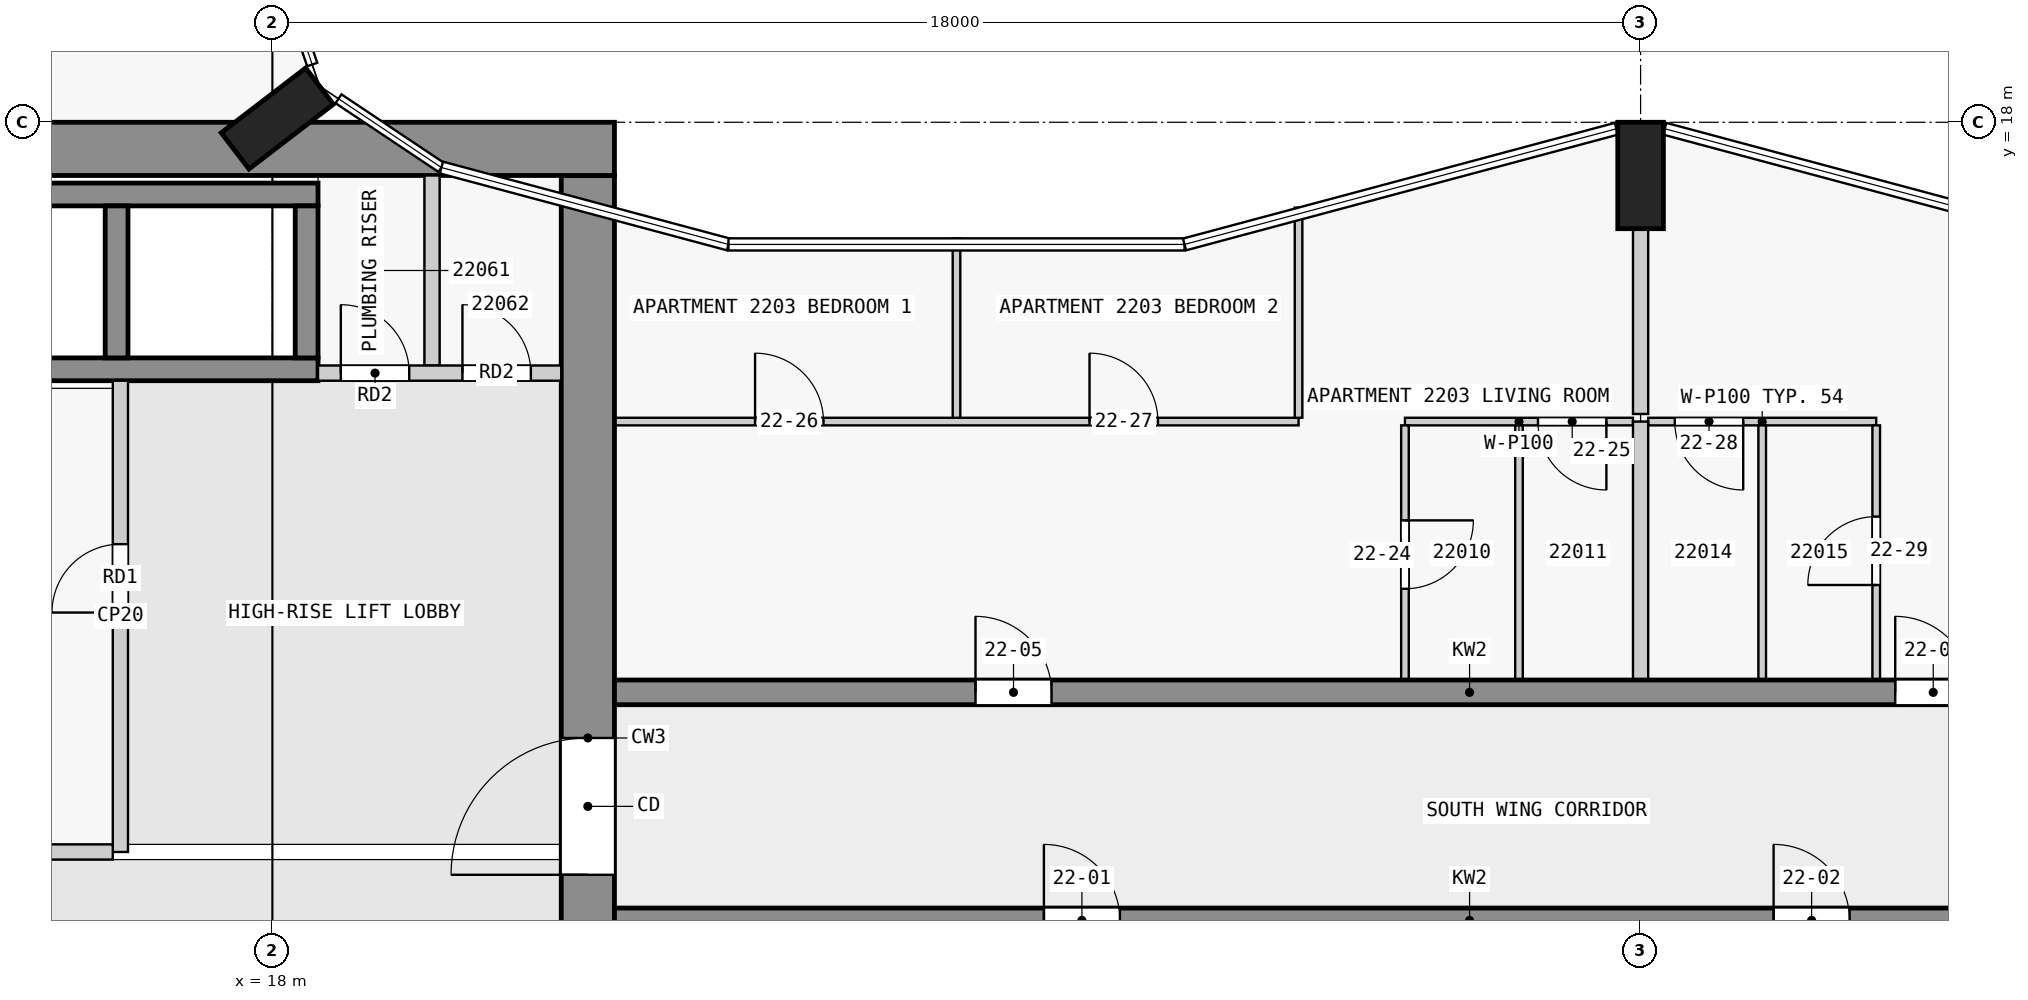
"""IFC4 building model, lengths in metres.
Left out: names, types, materials, properties, quantities, classifications, styles, units other than length and angle.
Written with IfcOpenShell. Run it as: python <this file> out.ifc"""

import sys

from ifc_helpers import new_model, si_unit, direction, frame, frame_2d, origin, origin_2d, place, context, subcontext, project, spatial, rectangle, extrude, element, fill, save


model = new_model("IFC4")
c1 = context("Model", 3, precision=1e-05, world=origin(), true_north=direction((0.0, 1.0)))
c2 = subcontext(c1, "Body", "Model", "MODEL_VIEW")
j1 = project(units=[si_unit("LENGTHUNIT", "METRE"), si_unit("PLANEANGLEUNIT", "RADIAN")], contexts=[c1])
p1 = place(None, origin())
s1 = spatial("IfcSite", under=j1, at=p1, CompositionType="ELEMENT")
p2 = place(p1, origin())
s2 = spatial("IfcBuilding", under=s1, at=p2, CompositionType="ELEMENT")
p3 = place(p2, frame((0.0, 0.0, 88.8)))
s3 = spatial("IfcBuildingStorey", under=s2, at=p3, CompositionType="ELEMENT", Elevation=88.8)
for number, where, z_axis, x_axis in (
    (1, (36.0, 17.3, 0.0), (0.0, 0.0, 1.0), (1.0, 0.0, 0.0)),
    (2, (18.065, 18.05, 0.0), (0.0, 0.0, 1.0), (-0.609, 0.793, 0.0)),
):
    element("IfcColumn", number, at=place(p3, frame(where, z_axis=z_axis, x_axis=x_axis)), inside=s3, PredefinedType="COLUMN", context=c2, shape_type="SweptSolid", body=[
        extrude(rectangle(XDim=0.6, YDim=1.4, at=origin_2d()), origin(), (0.0, 0.0, 1.0), 3.5),
    ])
p4 = place(p3, frame((1.6, 17.65, 0.0), z_axis=(0.0, 0.0, 1.0), x_axis=(1.0, 0.0, 0.0)))
e3 = element("IfcWall", 3, at=p4, inside=s3, PredefinedType="SHEAR", context=c2, shape_type="SweptSolid", body=[
    extrude(rectangle(XDim=20.9, YDim=0.7, at=frame_2d((10.45, 0.0))), origin(), (0.0, 0.0, 1.0), 3.25),
])
p5 = place(p4, frame((6.5, 0.0, 0.0)))
e4 = element("IfcOpeningElement", 4, at=p5, cuts=e3, PredefinedType="OPENING", context=c2, shape_type="SweptSolid", body=[
    extrude(rectangle(XDim=1.8, YDim=2.1, at=frame_2d((0.9, 1.05))), frame((0.0, 0.36, 0.0), z_axis=(0.0, -1.0, 0.0), x_axis=(1.0, 0.0, 0.0)), (0.0, 0.0, 1.0), 0.72),
])
p6 = place(p3, frame((22.15, 2.5, 0.0), z_axis=(0.0, 0.0, 1.0), x_axis=(0.0, 1.0, 0.0)))
e5 = element("IfcWall", 5, at=p6, inside=s3, PredefinedType="SHEAR", context=c2, shape_type="SweptSolid", body=[
    extrude(rectangle(XDim=14.8, YDim=0.7, at=frame_2d((7.4, 0.0))), origin(), (0.0, 0.0, 1.0), 3.25),
])
p7 = place(p6, frame((5.6, 0.0, 0.0)))
e6 = element("IfcOpeningElement", 6, at=p7, cuts=e5, PredefinedType="OPENING", context=c2, shape_type="SweptSolid", body=[
    extrude(rectangle(XDim=1.8, YDim=2.1, at=frame_2d((0.9, 1.05))), frame((0.0, 0.36, 0.0), z_axis=(0.0, -1.0, 0.0), x_axis=(1.0, 0.0, 0.0)), (0.0, 0.0, 1.0), 0.72),
])
for number, where, z_axis, x_axis in (
    (7, (10.8, 17.05, 0.0), (0.0, 0.0, 1.0), (1.0, 0.0, 0.0)),
    (8, (10.8, 14.75, 0.0), (0.0, 0.0, 1.0), (1.0, 0.0, 0.0)),
):
    element("IfcWall", number, at=place(p3, frame(where, z_axis=z_axis, x_axis=x_axis)), inside=s3, PredefinedType="SHEAR", context=c2, shape_type="SweptSolid", body=[
        extrude(rectangle(XDim=7.8, YDim=0.3, at=frame_2d((3.9, 0.0))), origin(), (0.0, 0.0, 1.0), 3.25),
    ])
for number, where, z_axis, x_axis in (
    (9, (15.95, 14.9, 0.0), (0.0, 0.0, 1.0), (0.0, 1.0, 0.0)),
    (10, (18.45, 14.9, 0.0), (0.0, 0.0, 1.0), (0.0, 1.0, 0.0)),
):
    element("IfcWall", number, at=place(p3, frame(where, z_axis=z_axis, x_axis=x_axis)), inside=s3, PredefinedType="SHEAR", context=c2, shape_type="SweptSolid", body=[
        extrude(rectangle(XDim=2.0, YDim=0.3, at=frame_2d((1.0, 0.0))), origin(), (0.0, 0.0, 1.0), 3.25),
    ])
p8 = place(p3, frame((22.5, 7.5, 0.0), z_axis=(0.0, 0.0, 1.0), x_axis=(1.0, 0.0, 0.0)))
e11 = element("IfcWall", 11, at=p8, inside=s3, PredefinedType="SHEAR", context=c2, shape_type="SweptSolid", body=[
    extrude(rectangle(XDim=22.5, YDim=0.325, at=frame_2d((11.25, 0.0))), origin(), (0.0, 0.0, 1.0), 3.25),
])
p9 = place(p8, frame((5.65, 0.0, 0.0)))
e12 = element("IfcOpeningElement", 12, at=p9, cuts=e11, PredefinedType="OPENING", context=c2, shape_type="SweptSolid", body=[
    extrude(rectangle(XDim=1.0, YDim=2.1, at=frame_2d((0.5, 1.05))), frame((0.0, 0.172, 0.0), z_axis=(0.0, -1.0, 0.0), x_axis=(1.0, 0.0, 0.0)), (0.0, 0.0, 1.0), 0.345),
])
p10 = place(p8, frame((15.25, 0.0, 0.0)))
e13 = element("IfcOpeningElement", 13, at=p10, cuts=e11, PredefinedType="OPENING", context=c2, shape_type="SweptSolid", body=[
    extrude(rectangle(XDim=1.0, YDim=2.1, at=frame_2d((0.5, 1.05))), frame((0.0, 0.172, 0.0), z_axis=(0.0, -1.0, 0.0), x_axis=(1.0, 0.0, 0.0)), (0.0, 0.0, 1.0), 0.345),
])
p11 = place(p8, frame((18.75, 0.0, 0.0)))
e14 = element("IfcOpeningElement", 14, at=p11, cuts=e11, PredefinedType="OPENING", context=c2, shape_type="SweptSolid", body=[
    extrude(rectangle(XDim=0.9, YDim=2.1, at=frame_2d((0.45, 1.05))), frame((0.0, 0.172, 0.0), z_axis=(0.0, -1.0, 0.0), x_axis=(1.0, 0.0, 0.0)), (0.0, 0.0, 1.0), 0.345),
])
p12 = place(p8, frame((20.95, 0.0, 0.0)))
e15 = element("IfcOpeningElement", 15, at=p12, cuts=e11, PredefinedType="OPENING", context=c2, shape_type="SweptSolid", body=[
    extrude(rectangle(XDim=1.0, YDim=2.1, at=frame_2d((0.5, 1.05))), frame((0.0, 0.172, 0.0), z_axis=(0.0, -1.0, 0.0), x_axis=(1.0, 0.0, 0.0)), (0.0, 0.0, 1.0), 0.345),
])
p13 = place(p3, frame((22.5, 10.5, 0.0), z_axis=(0.0, 0.0, 1.0), x_axis=(1.0, 0.0, 0.0)))
e16 = element("IfcWall", 16, at=p13, inside=s3, PredefinedType="SHEAR", context=c2, shape_type="SweptSolid", body=[
    extrude(rectangle(XDim=22.5, YDim=0.325, at=frame_2d((11.25, 0.0))), origin(), (0.0, 0.0, 1.0), 3.25),
])
p14 = place(p13, frame((4.75, 0.0, 0.0)))
e17 = element("IfcOpeningElement", 17, at=p14, cuts=e16, PredefinedType="OPENING", context=c2, shape_type="SweptSolid", body=[
    extrude(rectangle(XDim=1.0, YDim=2.1, at=frame_2d((0.5, 1.05))), frame((0.0, 0.172, 0.0), z_axis=(0.0, -1.0, 0.0), x_axis=(1.0, 0.0, 0.0)), (0.0, 0.0, 1.0), 0.345),
])
p15 = place(p13, frame((16.85, 0.0, 0.0)))
e18 = element("IfcOpeningElement", 18, at=p15, cuts=e16, PredefinedType="OPENING", context=c2, shape_type="SweptSolid", body=[
    extrude(rectangle(XDim=1.0, YDim=2.1, at=frame_2d((0.5, 1.05))), frame((0.0, 0.172, 0.0), z_axis=(0.0, -1.0, 0.0), x_axis=(1.0, 0.0, 0.0)), (0.0, 0.0, 1.0), 0.345),
])
p16 = place(p3, frame((10.9, 8.4, 0.0), z_axis=(0.0, 0.0, 1.0), x_axis=(1.0, 0.0, 0.0)))
e19 = element("IfcWall", 19, at=p16, inside=s3, PredefinedType="PARTITIONING", context=c2, shape_type="SweptSolid", body=[
    extrude(rectangle(XDim=5.0, YDim=0.2, at=frame_2d((2.5, 0.0))), origin(), (0.0, 0.0, 1.0), 3.25),
])
p17 = place(p3, frame((16.0, 8.4, 0.0), z_axis=(0.0, 0.0, 1.0), x_axis=(0.0, 1.0, 0.0)))
e20 = element("IfcWall", 20, at=p17, inside=s3, PredefinedType="PARTITIONING", context=c2, shape_type="SweptSolid", body=[
    extrude(rectangle(XDim=6.2, YDim=0.2, at=frame_2d((3.1, 0.0))), origin(), (0.0, 0.0, 1.0), 3.25),
])
p18 = place(p17, frame((3.15, 0.0, 0.0)))
e21 = element("IfcOpeningElement", 21, at=p18, cuts=e20, PredefinedType="OPENING", context=c2, shape_type="SweptSolid", body=[
    extrude(rectangle(XDim=0.9, YDim=2.1, at=frame_2d((0.45, 1.05))), frame((0.0, 0.11, 0.0), z_axis=(0.0, -1.0, 0.0), x_axis=(1.0, 0.0, 0.0)), (0.0, 0.0, 1.0), 0.22),
])
p19 = place(p3, frame((18.6, 14.7, 0.0), z_axis=(0.0, 0.0, 1.0), x_axis=(1.0, 0.0, 0.0)))
e22 = element("IfcWall", 22, at=p19, inside=s3, PredefinedType="PARTITIONING", context=c2, shape_type="SweptSolid", body=[
    extrude(rectangle(XDim=3.2, YDim=0.2, at=frame_2d((1.6, 0.0))), origin(), (0.0, 0.0, 1.0), 3.25),
])
p20 = place(p19, frame((0.3, 0.0, 0.0)))
e23 = element("IfcOpeningElement", 23, at=p20, cuts=e22, PredefinedType="OPENING", context=c2, shape_type="SweptSolid", body=[
    extrude(rectangle(XDim=0.9, YDim=2.1, at=frame_2d((0.45, 1.05))), frame((0.0, 0.11, 0.0), z_axis=(0.0, -1.0, 0.0), x_axis=(1.0, 0.0, 0.0)), (0.0, 0.0, 1.0), 0.22),
])
p21 = place(p19, frame((1.9, 0.0, 0.0)))
e24 = element("IfcOpeningElement", 24, at=p21, cuts=e22, PredefinedType="OPENING", context=c2, shape_type="SweptSolid", body=[
    extrude(rectangle(XDim=0.9, YDim=2.1, at=frame_2d((0.45, 1.05))), frame((0.0, 0.11, 0.0), z_axis=(0.0, -1.0, 0.0), x_axis=(1.0, 0.0, 0.0)), (0.0, 0.0, 1.0), 0.22),
])
p22 = place(p3, frame((20.1, 14.8, 0.0), z_axis=(0.0, 0.0, 1.0), x_axis=(0.0, 1.0, 0.0)))
e25 = element("IfcWall", 25, at=p22, inside=s3, PredefinedType="PARTITIONING", context=c2, shape_type="SweptSolid", body=[
    extrude(rectangle(XDim=2.5, YDim=0.2, at=frame_2d((1.25, 0.0))), origin(), (0.0, 0.0, 1.0), 3.25),
])
p23 = place(p3, frame((35.9, 14.062, 0.0), z_axis=(0.0, 0.0, 1.0), x_axis=(-1.0, 0.0, 0.0)))
e26 = element("IfcWall", 26, at=p23, inside=s3, PredefinedType="PARTITIONING", context=c2, shape_type="SweptSolid", body=[
    extrude(rectangle(XDim=3.0, YDim=0.1, at=frame_2d((1.5, 0.0))), origin(), (0.0, 0.0, 1.0), 3.25),
])
p24 = place(p23, frame((0.35, 0.0, 0.0)))
e27 = element("IfcOpeningElement", 27, at=p24, cuts=e26, PredefinedType="OPENING", context=c2, shape_type="SweptSolid", body=[
    extrude(rectangle(XDim=0.9, YDim=2.1, at=frame_2d((0.45, 1.05))), frame((0.0, 0.06, 0.0), z_axis=(0.0, -1.0, 0.0), x_axis=(1.0, 0.0, 0.0)), (0.0, 0.0, 1.0), 0.12),
])
p25 = place(p3, frame((39.1, 14.062, 0.0), z_axis=(0.0, 0.0, 1.0), x_axis=(-1.0, 0.0, 0.0)))
e28 = element("IfcWall", 28, at=p25, inside=s3, PredefinedType="PARTITIONING", context=c2, shape_type="SweptSolid", body=[
    extrude(rectangle(XDim=3.0, YDim=0.1, at=frame_2d((1.5, 0.0))), origin(), (0.0, 0.0, 1.0), 3.25),
])
p26 = place(p25, frame((1.75, 0.0, 0.0)))
e29 = element("IfcOpeningElement", 29, at=p26, cuts=e28, PredefinedType="OPENING", context=c2, shape_type="SweptSolid", body=[
    extrude(rectangle(XDim=0.9, YDim=2.1, at=frame_2d((0.45, 1.05))), frame((0.0, 0.06, 0.0), z_axis=(0.0, -1.0, 0.0), x_axis=(1.0, 0.0, 0.0)), (0.0, 0.0, 1.0), 0.12),
])
p27 = place(p3, frame((22.5, 14.062, 0.0), z_axis=(0.0, 0.0, 1.0), x_axis=(1.0, 0.0, 0.0)))
e30 = element("IfcWall", 30, at=p27, inside=s3, PredefinedType="PARTITIONING", context=c2, shape_type="SweptSolid", body=[
    extrude(rectangle(XDim=9.0, YDim=0.1, at=frame_2d((4.5, 0.0))), origin(), (0.0, 0.0, 1.0), 3.25),
])
p28 = place(p27, frame((1.85, 0.0, 0.0)))
e31 = element("IfcOpeningElement", 31, at=p28, cuts=e30, PredefinedType="OPENING", context=c2, shape_type="SweptSolid", body=[
    extrude(rectangle(XDim=0.9, YDim=2.1, at=frame_2d((0.45, 1.05))), frame((0.0, 0.06, 0.0), z_axis=(0.0, -1.0, 0.0), x_axis=(1.0, 0.0, 0.0)), (0.0, 0.0, 1.0), 0.12),
])
p29 = place(p27, frame((6.25, 0.0, 0.0)))
e32 = element("IfcOpeningElement", 32, at=p29, cuts=e30, PredefinedType="OPENING", context=c2, shape_type="SweptSolid", body=[
    extrude(rectangle(XDim=0.9, YDim=2.1, at=frame_2d((0.45, 1.05))), frame((0.0, 0.06, 0.0), z_axis=(0.0, -1.0, 0.0), x_axis=(1.0, 0.0, 0.0)), (0.0, 0.0, 1.0), 0.12),
])
p30 = place(p3, frame((27.0, 14.113, 0.0), z_axis=(0.0, 0.0, 1.0), x_axis=(0.0, 1.0, 0.0)))
e33 = element("IfcWall", 33, at=p30, inside=s3, PredefinedType="PARTITIONING", context=c2, shape_type="SweptSolid", body=[
    extrude(rectangle(XDim=2.361, YDim=0.1, at=frame_2d((1.18, 0.0))), origin(), (0.0, 0.0, 1.0), 3.25),
])
p31 = place(p3, frame((31.5, 14.113, 0.0), z_axis=(0.0, 0.0, 1.0), x_axis=(0.0, 1.0, 0.0)))
e34 = element("IfcWall", 34, at=p31, inside=s3, PredefinedType="PARTITIONING", context=c2, shape_type="SweptSolid", body=[
    extrude(rectangle(XDim=2.765, YDim=0.1, at=frame_2d((1.383, 0.0))), origin(), (0.0, 0.0, 1.0), 3.25),
])
p32 = place(p3, frame((32.9, 14.012, 0.0), z_axis=(0.0, 0.0, 1.0), x_axis=(0.0, -1.0, 0.0)))
e35 = element("IfcWall", 35, at=p32, inside=s3, PredefinedType="PARTITIONING", context=c2, shape_type="SweptSolid", body=[
    extrude(rectangle(XDim=3.35, YDim=0.1, at=frame_2d((1.675, 0.0))), origin(), (0.0, 0.0, 1.0), 3.25),
])
p33 = place(p32, frame((1.25, 0.0, 0.0)))
e36 = element("IfcOpeningElement", 36, at=p33, cuts=e35, PredefinedType="OPENING", context=c2, shape_type="SweptSolid", body=[
    extrude(rectangle(XDim=0.9, YDim=2.1, at=frame_2d((0.45, 1.05))), frame((0.0, 0.06, 0.0), z_axis=(0.0, -1.0, 0.0), x_axis=(1.0, 0.0, 0.0)), (0.0, 0.0, 1.0), 0.12),
])
p34 = place(p3, frame((34.4, 10.663, 0.0), z_axis=(0.0, 0.0, 1.0), x_axis=(0.0, 1.0, 0.0)))
e37 = element("IfcWall", 37, at=p34, inside=s3, PredefinedType="PARTITIONING", context=c2, shape_type="SweptSolid", body=[
    extrude(rectangle(XDim=3.35, YDim=0.1, at=frame_2d((1.675, 0.0))), origin(), (0.0, 0.0, 1.0), 3.25),
])
p35 = place(p3, frame((36.0, 16.6, 0.0), z_axis=(0.0, 0.0, 1.0), x_axis=(0.0, -1.0, 0.0)))
e38 = element("IfcWall", 38, at=p35, inside=s3, PredefinedType="PARTITIONING", context=c2, shape_type="SweptSolid", body=[
    extrude(rectangle(XDim=2.438, YDim=0.2, at=frame_2d((1.219, 0.0))), origin(), (0.0, 0.0, 1.0), 3.25),
])
p36 = place(p3, frame((36.0, 10.663, 0.0), z_axis=(0.0, 0.0, 1.0), x_axis=(0.0, 1.0, 0.0)))
e39 = element("IfcWall", 39, at=p36, inside=s3, PredefinedType="PARTITIONING", context=c2, shape_type="SweptSolid", body=[
    extrude(rectangle(XDim=3.4, YDim=0.2, at=frame_2d((1.7, 0.0))), origin(), (0.0, 0.0, 1.0), 3.25),
])
p37 = place(p3, frame((37.6, 10.663, 0.0), z_axis=(0.0, 0.0, 1.0), x_axis=(0.0, 1.0, 0.0)))
e40 = element("IfcWall", 40, at=p37, inside=s3, PredefinedType="PARTITIONING", context=c2, shape_type="SweptSolid", body=[
    extrude(rectangle(XDim=3.35, YDim=0.1, at=frame_2d((1.675, 0.0))), origin(), (0.0, 0.0, 1.0), 3.25),
])
p38 = place(p3, frame((39.1, 10.663, 0.0), z_axis=(0.0, 0.0, 1.0), x_axis=(0.0, 1.0, 0.0)))
e41 = element("IfcWall", 41, at=p38, inside=s3, PredefinedType="PARTITIONING", context=c2, shape_type="SweptSolid", body=[
    extrude(rectangle(XDim=3.35, YDim=0.1, at=frame_2d((1.675, 0.0))), origin(), (0.0, 0.0, 1.0), 3.25),
])
p39 = place(p38, frame((1.25, 0.0, 0.0)))
e42 = element("IfcOpeningElement", 42, at=p39, cuts=e41, PredefinedType="OPENING", context=c2, shape_type="SweptSolid", body=[
    extrude(rectangle(XDim=0.9, YDim=2.1, at=frame_2d((0.45, 1.05))), frame((0.0, 0.06, 0.0), z_axis=(0.0, -1.0, 0.0), x_axis=(1.0, 0.0, 0.0)), (0.0, 0.0, 1.0), 0.12),
])
p40 = place(p18, origin())
e43 = element("IfcDoor", 43, at=p40, inside=s3, OperationType="SINGLE_SWING_LEFT", PredefinedType="DOOR", context=c2, shape_type="SweptSolid", body=[
    extrude(rectangle(XDim=0.9, YDim=2.1, at=frame_2d((0.45, 1.05))), frame((0.0, 0.025, 0.0), z_axis=(0.0, -1.0, 0.0), x_axis=(1.0, 0.0, 0.0)), (0.0, 0.0, 1.0), 0.05),
])
fill(e21, e43)
p41 = place(p7, origin())
e44 = element("IfcDoor", 44, at=p41, inside=s3, OperationType="DOUBLE_DOOR_SINGLE_SWING", PredefinedType="DOOR", context=c2, shape_type="SweptSolid", body=[
    extrude(rectangle(XDim=1.8, YDim=2.1, at=frame_2d((0.9, 1.05))), frame((0.0, 0.025, 0.0), z_axis=(0.0, -1.0, 0.0), x_axis=(1.0, 0.0, 0.0)), (0.0, 0.0, 1.0), 0.05),
])
fill(e6, e44)
p42 = place(p20, origin())
e45 = element("IfcDoor", 45, at=p42, inside=s3, OperationType="SINGLE_SWING_LEFT", PredefinedType="DOOR", context=c2, shape_type="SweptSolid", body=[
    extrude(rectangle(XDim=0.9, YDim=2.1, at=frame_2d((0.45, 1.05))), frame((0.0, 0.025, 0.0), z_axis=(0.0, -1.0, 0.0), x_axis=(1.0, 0.0, 0.0)), (0.0, 0.0, 1.0), 0.05),
])
fill(e23, e45)
p43 = place(p21, origin())
e46 = element("IfcDoor", 46, at=p43, inside=s3, OperationType="SINGLE_SWING_LEFT", PredefinedType="DOOR", context=c2, shape_type="SweptSolid", body=[
    extrude(rectangle(XDim=0.9, YDim=2.1, at=frame_2d((0.45, 1.05))), frame((0.0, 0.025, 0.0), z_axis=(0.0, -1.0, 0.0), x_axis=(1.0, 0.0, 0.0)), (0.0, 0.0, 1.0), 0.05),
])
fill(e24, e46)
p44 = place(p9, origin())
e47 = element("IfcDoor", 47, at=p44, inside=s3, OperationType="SINGLE_SWING_LEFT", PredefinedType="DOOR", context=c2, shape_type="SweptSolid", body=[
    extrude(rectangle(XDim=1.0, YDim=2.1, at=frame_2d((0.5, 1.05))), frame((0.0, 0.025, 0.0), z_axis=(0.0, -1.0, 0.0), x_axis=(1.0, 0.0, 0.0)), (0.0, 0.0, 1.0), 0.05),
])
fill(e12, e47)
p45 = place(p10, origin())
e48 = element("IfcDoor", 48, at=p45, inside=s3, OperationType="SINGLE_SWING_RIGHT", PredefinedType="DOOR", context=c2, shape_type="SweptSolid", body=[
    extrude(rectangle(XDim=1.0, YDim=2.1, at=frame_2d((0.5, 1.05))), frame((0.0, 0.025, 0.0), z_axis=(0.0, -1.0, 0.0), x_axis=(1.0, 0.0, 0.0)), (0.0, 0.0, 1.0), 0.05),
])
fill(e13, e48)
p46 = place(p14, origin())
e49 = element("IfcDoor", 49, at=p46, inside=s3, OperationType="SINGLE_SWING_LEFT", PredefinedType="DOOR", context=c2, shape_type="SweptSolid", body=[
    extrude(rectangle(XDim=1.0, YDim=2.1, at=frame_2d((0.5, 1.05))), frame((0.0, 0.025, 0.0), z_axis=(0.0, -1.0, 0.0), x_axis=(1.0, 0.0, 0.0)), (0.0, 0.0, 1.0), 0.05),
])
fill(e17, e49)
p47 = place(p15, origin())
e50 = element("IfcDoor", 50, at=p47, inside=s3, OperationType="SINGLE_SWING_RIGHT", PredefinedType="DOOR", context=c2, shape_type="SweptSolid", body=[
    extrude(rectangle(XDim=1.0, YDim=2.1, at=frame_2d((0.5, 1.05))), frame((0.0, 0.025, 0.0), z_axis=(0.0, -1.0, 0.0), x_axis=(1.0, 0.0, 0.0)), (0.0, 0.0, 1.0), 0.05),
])
fill(e18, e50)
p48 = place(p33, origin())
e51 = element("IfcDoor", 51, at=p48, inside=s3, OperationType="SINGLE_SWING_RIGHT", PredefinedType="DOOR", context=c2, shape_type="SweptSolid", body=[
    extrude(rectangle(XDim=0.9, YDim=2.1, at=frame_2d((0.45, 1.05))), frame((0.0, 0.025, 0.0), z_axis=(0.0, -1.0, 0.0), x_axis=(1.0, 0.0, 0.0)), (0.0, 0.0, 1.0), 0.05),
])
fill(e36, e51)
p49 = place(p24, origin())
e52 = element("IfcDoor", 52, at=p49, inside=s3, OperationType="SINGLE_SWING_LEFT", PredefinedType="DOOR", context=c2, shape_type="SweptSolid", body=[
    extrude(rectangle(XDim=0.9, YDim=2.1, at=frame_2d((0.45, 1.05))), frame((0.0, 0.025, 0.0), z_axis=(0.0, -1.0, 0.0), x_axis=(1.0, 0.0, 0.0)), (0.0, 0.0, 1.0), 0.05),
])
fill(e27, e52)
p50 = place(p28, origin())
e53 = element("IfcDoor", 53, at=p50, inside=s3, OperationType="SINGLE_SWING_LEFT", PredefinedType="DOOR", context=c2, shape_type="SweptSolid", body=[
    extrude(rectangle(XDim=0.9, YDim=2.1, at=frame_2d((0.45, 1.05))), frame((0.0, 0.025, 0.0), z_axis=(0.0, -1.0, 0.0), x_axis=(1.0, 0.0, 0.0)), (0.0, 0.0, 1.0), 0.05),
])
fill(e31, e53)
p51 = place(p29, origin())
e54 = element("IfcDoor", 54, at=p51, inside=s3, OperationType="SINGLE_SWING_RIGHT", PredefinedType="DOOR", context=c2, shape_type="SweptSolid", body=[
    extrude(rectangle(XDim=0.9, YDim=2.1, at=frame_2d((0.45, 1.05))), frame((0.0, 0.025, 0.0), z_axis=(0.0, -1.0, 0.0), x_axis=(1.0, 0.0, 0.0)), (0.0, 0.0, 1.0), 0.05),
])
fill(e32, e54)
p52 = place(p26, origin())
e55 = element("IfcDoor", 55, at=p52, inside=s3, OperationType="SINGLE_SWING_RIGHT", PredefinedType="DOOR", context=c2, shape_type="SweptSolid", body=[
    extrude(rectangle(XDim=0.9, YDim=2.1, at=frame_2d((0.45, 1.05))), frame((0.0, 0.025, 0.0), z_axis=(0.0, -1.0, 0.0), x_axis=(1.0, 0.0, 0.0)), (0.0, 0.0, 1.0), 0.05),
])
fill(e29, e55)
p53 = place(p39, origin())
e56 = element("IfcDoor", 56, at=p53, inside=s3, OperationType="SINGLE_SWING_RIGHT", PredefinedType="DOOR", context=c2, shape_type="SweptSolid", body=[
    extrude(rectangle(XDim=0.9, YDim=2.1, at=frame_2d((0.45, 1.05))), frame((0.0, 0.025, 0.0), z_axis=(0.0, -1.0, 0.0), x_axis=(1.0, 0.0, 0.0)), (0.0, 0.0, 1.0), 0.05),
])
fill(e42, e56)
save(model, sys.argv[1])
